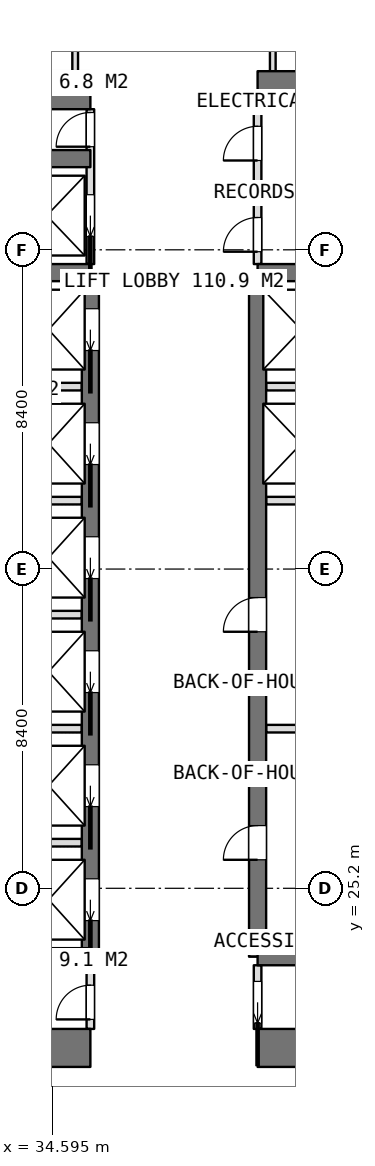
"""IFC4 building model, lengths in metres.
Left out: names, types, materials, properties, quantities, classifications, styles, units other than length and angle.
Written with IfcOpenShell. Run it as: python <this file> out.ifc"""

import sys

from ifc_helpers import new_model, si_unit, direction, frame, frame_2d, origin, place, context, subcontext, project, spatial, rectangle, extrude, element, fill, save


model = new_model("IFC4")
c1 = context("Model", 3, precision=1e-05, world=origin(), true_north=direction((0.0, 1.0)))
c2 = subcontext(c1, "Body", "Model", "MODEL_VIEW")
j1 = project(units=[si_unit("LENGTHUNIT", "METRE"), si_unit("PLANEANGLEUNIT", "RADIAN")], contexts=[c1])
p1 = place(None, origin())
s1 = spatial("IfcSite", under=j1, at=p1, CompositionType="ELEMENT")
p2 = place(p1, origin())
s2 = spatial("IfcBuilding", under=s1, at=p2, CompositionType="ELEMENT")
p3 = place(p2, frame((0.0, 0.0, 225.2)))
s3 = spatial("IfcBuildingStorey", under=s2, at=p3, CompositionType="ELEMENT", Elevation=225.2)
p4 = place(p3, frame((25.2, 21.0, 0.0), z_axis=(0.0, 0.0, 1.0), x_axis=(1.0, 0.0, 0.0)))
e1 = element("IfcWall", 1, at=p4, inside=s3, PredefinedType="SHEAR", context=c2, shape_type="SweptSolid", body=[
    extrude(rectangle(XDim=10.4, YDim=1.0, at=frame_2d((5.2, 0.0))), origin(), (0.0, 0.0, 1.0), 3.75),
])
p5 = place(p3, frame((40.0, 21.0, 0.0), z_axis=(0.0, 0.0, 1.0), x_axis=(1.0, 0.0, 0.0)))
e2 = element("IfcWall", 2, at=p5, inside=s3, PredefinedType="SHEAR", context=c2, shape_type="SweptSolid", body=[
    extrude(rectangle(XDim=10.4, YDim=1.0, at=frame_2d((5.2, 0.0))), origin(), (0.0, 0.0, 1.0), 3.75),
])
p6 = place(p3, frame((25.2, 46.2, 0.0), z_axis=(0.0, 0.0, 1.0), x_axis=(1.0, 0.0, 0.0)))
e3 = element("IfcWall", 3, at=p6, inside=s3, PredefinedType="SHEAR", context=c2, shape_type="SweptSolid", body=[
    extrude(rectangle(XDim=10.4, YDim=1.0, at=frame_2d((5.2, 0.0))), origin(), (0.0, 0.0, 1.0), 3.75),
])
p7 = place(p3, frame((40.0, 46.2, 0.0), z_axis=(0.0, 0.0, 1.0), x_axis=(1.0, 0.0, 0.0)))
e4 = element("IfcWall", 4, at=p7, inside=s3, PredefinedType="SHEAR", context=c2, shape_type="SweptSolid", body=[
    extrude(rectangle(XDim=10.4, YDim=1.0, at=frame_2d((5.2, 0.0))), origin(), (0.0, 0.0, 1.0), 3.75),
])
p8 = place(p3, frame((35.6, 23.4, 0.0), z_axis=(0.0, 0.0, 1.0), x_axis=(0.0, 1.0, 0.0)))
e5 = element("IfcWall", 5, at=p8, inside=s3, PredefinedType="SHEAR", context=c2, shape_type="SweptSolid", body=[
    extrude(rectangle(XDim=18.0, YDim=0.45, at=frame_2d((9.0, 0.0))), origin(), (0.0, 0.0, 1.0), 3.75),
])
p9 = place(p8, frame((0.95, 0.0, 0.0)))
e6 = element("IfcOpeningElement", 6, at=p9, cuts=e5, PredefinedType="OPENING", context=c2, shape_type="SweptSolid", body=[
    extrude(rectangle(XDim=1.1, YDim=2.1, at=frame_2d((0.55, 1.05))), frame((0.0, 0.235, 0.0), z_axis=(0.0, -1.0, 0.0), x_axis=(1.0, 0.0, 0.0)), (0.0, 0.0, 1.0), 0.47),
])
p10 = place(p8, frame((3.95, 0.0, 0.0)))
e7 = element("IfcOpeningElement", 7, at=p10, cuts=e5, PredefinedType="OPENING", context=c2, shape_type="SweptSolid", body=[
    extrude(rectangle(XDim=1.1, YDim=2.1, at=frame_2d((0.55, 1.05))), frame((0.0, 0.235, 0.0), z_axis=(0.0, -1.0, 0.0), x_axis=(1.0, 0.0, 0.0)), (0.0, 0.0, 1.0), 0.47),
])
p11 = place(p8, frame((6.95, 0.0, 0.0)))
e8 = element("IfcOpeningElement", 8, at=p11, cuts=e5, PredefinedType="OPENING", context=c2, shape_type="SweptSolid", body=[
    extrude(rectangle(XDim=1.1, YDim=2.1, at=frame_2d((0.55, 1.05))), frame((0.0, 0.235, 0.0), z_axis=(0.0, -1.0, 0.0), x_axis=(1.0, 0.0, 0.0)), (0.0, 0.0, 1.0), 0.47),
])
p12 = place(p8, frame((9.95, 0.0, 0.0)))
e9 = element("IfcOpeningElement", 9, at=p12, cuts=e5, PredefinedType="OPENING", context=c2, shape_type="SweptSolid", body=[
    extrude(rectangle(XDim=1.1, YDim=2.1, at=frame_2d((0.55, 1.05))), frame((0.0, 0.235, 0.0), z_axis=(0.0, -1.0, 0.0), x_axis=(1.0, 0.0, 0.0)), (0.0, 0.0, 1.0), 0.47),
])
p13 = place(p8, frame((12.95, 0.0, 0.0)))
e10 = element("IfcOpeningElement", 10, at=p13, cuts=e5, PredefinedType="OPENING", context=c2, shape_type="SweptSolid", body=[
    extrude(rectangle(XDim=1.1, YDim=2.1, at=frame_2d((0.55, 1.05))), frame((0.0, 0.235, 0.0), z_axis=(0.0, -1.0, 0.0), x_axis=(1.0, 0.0, 0.0)), (0.0, 0.0, 1.0), 0.47),
])
p14 = place(p8, frame((15.95, 0.0, 0.0)))
e11 = element("IfcOpeningElement", 11, at=p14, cuts=e5, PredefinedType="OPENING", context=c2, shape_type="SweptSolid", body=[
    extrude(rectangle(XDim=1.1, YDim=2.1, at=frame_2d((0.55, 1.05))), frame((0.0, 0.235, 0.0), z_axis=(0.0, -1.0, 0.0), x_axis=(1.0, 0.0, 0.0)), (0.0, 0.0, 1.0), 0.47),
])
p15 = place(p3, frame((40.0, 23.4, 0.0), z_axis=(0.0, 0.0, 1.0), x_axis=(0.0, 1.0, 0.0)))
e12 = element("IfcWall", 12, at=p15, inside=s3, PredefinedType="SHEAR", context=c2, shape_type="SweptSolid", body=[
    extrude(rectangle(XDim=18.0, YDim=0.45, at=frame_2d((9.0, 0.0))), origin(), (0.0, 0.0, 1.0), 3.75),
])
p16 = place(p15, frame((2.55, 0.0, 0.0)))
e13 = element("IfcOpeningElement", 13, at=p16, cuts=e12, PredefinedType="OPENING", context=c2, shape_type="SweptSolid", body=[
    extrude(rectangle(XDim=0.9, YDim=2.1, at=frame_2d((0.45, 1.05))), frame((0.0, 0.235, 0.0), z_axis=(0.0, -1.0, 0.0), x_axis=(1.0, 0.0, 0.0)), (0.0, 0.0, 1.0), 0.47),
])
p17 = place(p15, frame((8.55, 0.0, 0.0)))
e14 = element("IfcOpeningElement", 14, at=p17, cuts=e12, PredefinedType="OPENING", context=c2, shape_type="SweptSolid", body=[
    extrude(rectangle(XDim=0.9, YDim=2.1, at=frame_2d((0.45, 1.05))), frame((0.0, 0.235, 0.0), z_axis=(0.0, -1.0, 0.0), x_axis=(1.0, 0.0, 0.0)), (0.0, 0.0, 1.0), 0.47),
])
for number, where, z_axis, x_axis in (
    (15, (31.8, 23.4, 0.0), (0.0, 0.0, 1.0), (1.0, 0.0, 0.0)),
    (16, (31.8, 41.4, 0.0), (0.0, 0.0, 1.0), (1.0, 0.0, 0.0)),
    (17, (31.8, 44.4, 0.0), (0.0, 0.0, 1.0), (1.0, 0.0, 0.0)),
    (18, (40.0, 23.4, 0.0), (0.0, 0.0, 1.0), (1.0, 0.0, 0.0)),
    (19, (40.0, 41.4, 0.0), (0.0, 0.0, 1.0), (1.0, 0.0, 0.0)),
):
    element("IfcWall", number, at=place(p3, frame(where, z_axis=z_axis, x_axis=x_axis)), inside=s3, PredefinedType="SHEAR", context=c2, shape_type="SweptSolid", body=[
        extrude(rectangle(XDim=3.8, YDim=0.45, at=frame_2d((1.9, 0.0))), origin(), (0.0, 0.0, 1.0), 3.75),
    ])
for number, where, z_axis, x_axis in (
    (20, (32.025, 26.4, 0.0), (0.0, 0.0, 1.0), (1.0, 0.0, 0.0)),
    (21, (32.025, 29.4, 0.0), (0.0, 0.0, 1.0), (1.0, 0.0, 0.0)),
    (22, (32.025, 32.4, 0.0), (0.0, 0.0, 1.0), (1.0, 0.0, 0.0)),
    (23, (32.025, 35.4, 0.0), (0.0, 0.0, 1.0), (1.0, 0.0, 0.0)),
    (24, (32.025, 38.4, 0.0), (0.0, 0.0, 1.0), (1.0, 0.0, 0.0)),
):
    element("IfcWall", number, at=place(p3, frame(where, z_axis=z_axis, x_axis=x_axis)), inside=s3, PredefinedType="PARTITIONING", context=c2, shape_type="SweptSolid", body=[
        extrude(rectangle(XDim=3.35, YDim=0.2, at=frame_2d((1.675, 0.0))), origin(), (0.0, 0.0, 1.0), 3.5),
    ])
for number, where, z_axis, x_axis in (
    (25, (40.225, 29.4, 0.0), (0.0, 0.0, 1.0), (1.0, 0.0, 0.0)),
    (26, (40.225, 35.4, 0.0), (0.0, 0.0, 1.0), (1.0, 0.0, 0.0)),
    (27, (40.225, 38.4, 0.0), (0.0, 0.0, 1.0), (1.0, 0.0, 0.0)),
):
    element("IfcWall", number, at=place(p3, frame(where, z_axis=z_axis, x_axis=x_axis)), inside=s3, PredefinedType="PARTITIONING", context=c2, shape_type="SweptSolid", body=[
        extrude(rectangle(XDim=3.35, YDim=0.2, at=frame_2d((1.675, 0.0))), origin(), (0.0, 0.0, 1.0), 3.5),
    ])
p18 = place(p3, frame((40.0, 21.5, 0.0), z_axis=(0.0, 0.0, 1.0), x_axis=(0.0, 1.0, 0.0)))
e28 = element("IfcWall", 28, at=p18, inside=s3, PredefinedType="PARTITIONING", context=c2, shape_type="SweptSolid", body=[
    extrude(rectangle(XDim=1.675, YDim=0.2, at=frame_2d((0.837, 0.0))), origin(), (0.0, 0.0, 1.0), 3.5),
])
p19 = place(p18, frame((0.15, 0.0, 0.0)))
e29 = element("IfcOpeningElement", 29, at=p19, cuts=e28, PredefinedType="OPENING", context=c2, shape_type="SweptSolid", body=[
    extrude(rectangle(XDim=1.1, YDim=2.1, at=frame_2d((0.55, 1.05))), frame((0.0, 0.11, 0.0), z_axis=(0.0, -1.0, 0.0), x_axis=(1.0, 0.0, 0.0)), (0.0, 0.0, 1.0), 0.22),
])
p20 = place(p3, frame((40.0, 41.625, 0.0), z_axis=(0.0, 0.0, 1.0), x_axis=(0.0, 1.0, 0.0)))
e30 = element("IfcWall", 30, at=p20, inside=s3, PredefinedType="PARTITIONING", context=c2, shape_type="SweptSolid", body=[
    extrude(rectangle(XDim=4.075, YDim=0.2, at=frame_2d((2.038, 0.0))), origin(), (0.0, 0.0, 1.0), 3.5),
])
p21 = place(p20, frame((2.725, 0.0, 0.0)))
e31 = element("IfcOpeningElement", 31, at=p21, cuts=e30, PredefinedType="OPENING", context=c2, shape_type="SweptSolid", body=[
    extrude(rectangle(XDim=0.9, YDim=2.1, at=frame_2d((0.45, 1.05))), frame((0.0, 0.11, 0.0), z_axis=(0.0, -1.0, 0.0), x_axis=(1.0, 0.0, 0.0)), (0.0, 0.0, 1.0), 0.22),
])
p22 = place(p20, frame((0.325, 0.0, 0.0)))
e32 = element("IfcOpeningElement", 32, at=p22, cuts=e30, PredefinedType="OPENING", context=c2, shape_type="SweptSolid", body=[
    extrude(rectangle(XDim=0.9, YDim=2.1, at=frame_2d((0.45, 1.05))), frame((0.0, 0.11, 0.0), z_axis=(0.0, -1.0, 0.0), x_axis=(1.0, 0.0, 0.0)), (0.0, 0.0, 1.0), 0.22),
])
p23 = place(p3, frame((35.6, 41.625, 0.0), z_axis=(0.0, 0.0, 1.0), x_axis=(0.0, 1.0, 0.0)))
e33 = element("IfcWall", 33, at=p23, inside=s3, PredefinedType="PARTITIONING", context=c2, shape_type="SweptSolid", body=[
    extrude(rectangle(XDim=4.075, YDim=0.2, at=frame_2d((2.038, 0.0))), origin(), (0.0, 0.0, 1.0), 3.5),
])
p24 = place(p23, frame((3.088, 0.0, 0.0)))
e34 = element("IfcOpeningElement", 34, at=p24, cuts=e33, PredefinedType="OPENING", context=c2, shape_type="SweptSolid", body=[
    extrude(rectangle(XDim=0.9, YDim=2.1, at=frame_2d((0.45, 1.05))), frame((0.0, 0.11, 0.0), z_axis=(0.0, -1.0, 0.0), x_axis=(1.0, 0.0, 0.0)), (0.0, 0.0, 1.0), 0.22),
])
p25 = place(p23, frame((0.725, 0.0, 0.0)))
e35 = element("IfcOpeningElement", 35, at=p25, cuts=e33, PredefinedType="OPENING", context=c2, shape_type="SweptSolid", body=[
    extrude(rectangle(XDim=1.1, YDim=2.1, at=frame_2d((0.55, 1.05))), frame((0.0, 0.11, 0.0), z_axis=(0.0, -1.0, 0.0), x_axis=(1.0, 0.0, 0.0)), (0.0, 0.0, 1.0), 0.22),
])
p26 = place(p3, frame((35.6, 21.5, 0.0), z_axis=(0.0, 0.0, 1.0), x_axis=(0.0, 1.0, 0.0)))
e36 = element("IfcWall", 36, at=p26, inside=s3, PredefinedType="PARTITIONING", context=c2, shape_type="SweptSolid", body=[
    extrude(rectangle(XDim=1.675, YDim=0.2, at=frame_2d((0.837, 0.0))), origin(), (0.0, 0.0, 1.0), 3.5),
])
p27 = place(p26, frame((0.25, 0.0, 0.0)))
e37 = element("IfcOpeningElement", 37, at=p27, cuts=e36, PredefinedType="OPENING", context=c2, shape_type="SweptSolid", body=[
    extrude(rectangle(XDim=0.9, YDim=2.1, at=frame_2d((0.45, 1.05))), frame((0.0, 0.11, 0.0), z_axis=(0.0, -1.0, 0.0), x_axis=(1.0, 0.0, 0.0)), (0.0, 0.0, 1.0), 0.22),
])
p28 = place(p3, frame((40.0, 43.4, 0.0), z_axis=(0.0, 0.0, 1.0), x_axis=(1.0, 0.0, 0.0)))
e38 = element("IfcWall", 38, at=p28, inside=s3, PredefinedType="PARTITIONING", context=c2, shape_type="SweptSolid", body=[
    extrude(rectangle(XDim=3.575, YDim=0.2, at=frame_2d((1.788, 0.0))), origin(), (0.0, 0.0, 1.0), 3.5),
])
for number, where, z_axis, x_axis in (
    (39, (40.4, 46.7, 0.0), (0.0, 0.0, 1.0), (0.0, 1.0, 0.0)),
    (40, (35.2, 46.7, 0.0), (0.0, 0.0, 1.0), (0.0, 1.0, 0.0)),
):
    element("IfcWall", number, at=place(p3, frame(where, z_axis=z_axis, x_axis=x_axis)), inside=s3, PredefinedType="PARTITIONING", context=c2, shape_type="SweptSolid", body=[
        extrude(rectangle(XDim=2.625, YDim=0.15, at=frame_2d((1.312, 0.0))), origin(), (0.0, 0.0, 1.0), 3.5),
    ])
p29 = place(p19, origin())
e41 = element("IfcDoor", 41, at=p29, inside=s3, OperationType="SLIDING_TO_LEFT", PredefinedType="DOOR", context=c2, shape_type="SweptSolid", body=[
    extrude(rectangle(XDim=1.1, YDim=2.1, at=frame_2d((0.55, 1.05))), frame((0.0, 0.025, 0.0), z_axis=(0.0, -1.0, 0.0), x_axis=(1.0, 0.0, 0.0)), (0.0, 0.0, 1.0), 0.05),
])
fill(e29, e41)
p30 = place(p27, origin())
e42 = element("IfcDoor", 42, at=p30, inside=s3, OperationType="SINGLE_SWING_LEFT", PredefinedType="DOOR", context=c2, shape_type="SweptSolid", body=[
    extrude(rectangle(XDim=0.9, YDim=2.1, at=frame_2d((0.45, 1.05))), frame((0.0, 0.025, 0.0), z_axis=(0.0, -1.0, 0.0), x_axis=(1.0, 0.0, 0.0)), (0.0, 0.0, 1.0), 0.05),
])
fill(e37, e42)
p31 = place(p21, origin())
e43 = element("IfcDoor", 43, at=p31, inside=s3, OperationType="SINGLE_SWING_LEFT", PredefinedType="DOOR", context=c2, shape_type="SweptSolid", body=[
    extrude(rectangle(XDim=0.9, YDim=2.1, at=frame_2d((0.45, 1.05))), frame((0.0, 0.025, 0.0), z_axis=(0.0, -1.0, 0.0), x_axis=(1.0, 0.0, 0.0)), (0.0, 0.0, 1.0), 0.05),
])
fill(e31, e43)
p32 = place(p22, origin())
e44 = element("IfcDoor", 44, at=p32, inside=s3, OperationType="SINGLE_SWING_LEFT", PredefinedType="DOOR", context=c2, shape_type="SweptSolid", body=[
    extrude(rectangle(XDim=0.9, YDim=2.1, at=frame_2d((0.45, 1.05))), frame((0.0, 0.025, 0.0), z_axis=(0.0, -1.0, 0.0), x_axis=(1.0, 0.0, 0.0)), (0.0, 0.0, 1.0), 0.05),
])
fill(e32, e44)
p33 = place(p16, origin())
e45 = element("IfcDoor", 45, at=p33, inside=s3, OperationType="SINGLE_SWING_LEFT", PredefinedType="DOOR", context=c2, shape_type="SweptSolid", body=[
    extrude(rectangle(XDim=0.9, YDim=2.1, at=frame_2d((0.45, 1.05))), frame((0.0, 0.025, 0.0), z_axis=(0.0, -1.0, 0.0), x_axis=(1.0, 0.0, 0.0)), (0.0, 0.0, 1.0), 0.05),
])
fill(e13, e45)
p34 = place(p17, origin())
e46 = element("IfcDoor", 46, at=p34, inside=s3, OperationType="SINGLE_SWING_LEFT", PredefinedType="DOOR", context=c2, shape_type="SweptSolid", body=[
    extrude(rectangle(XDim=0.9, YDim=2.1, at=frame_2d((0.45, 1.05))), frame((0.0, 0.025, 0.0), z_axis=(0.0, -1.0, 0.0), x_axis=(1.0, 0.0, 0.0)), (0.0, 0.0, 1.0), 0.05),
])
fill(e14, e46)
p35 = place(p24, origin())
e47 = element("IfcDoor", 47, at=p35, inside=s3, OperationType="SINGLE_SWING_LEFT", PredefinedType="DOOR", context=c2, shape_type="SweptSolid", body=[
    extrude(rectangle(XDim=0.9, YDim=2.1, at=frame_2d((0.45, 1.05))), frame((0.0, 0.025, 0.0), z_axis=(0.0, -1.0, 0.0), x_axis=(1.0, 0.0, 0.0)), (0.0, 0.0, 1.0), 0.05),
])
fill(e34, e47)
p36 = place(p9, origin())
e48 = element("IfcDoor", 48, at=p36, inside=s3, OperationType="SLIDING_TO_LEFT", PredefinedType="USERDEFINED", context=c2, shape_type="SweptSolid", body=[
    extrude(rectangle(XDim=1.1, YDim=2.1, at=frame_2d((0.55, 1.05))), frame((0.0, 0.025, 0.0), z_axis=(0.0, -1.0, 0.0), x_axis=(1.0, 0.0, 0.0)), (0.0, 0.0, 1.0), 0.05),
])
fill(e6, e48)
p37 = place(p10, origin())
e49 = element("IfcDoor", 49, at=p37, inside=s3, OperationType="SLIDING_TO_LEFT", PredefinedType="USERDEFINED", context=c2, shape_type="SweptSolid", body=[
    extrude(rectangle(XDim=1.1, YDim=2.1, at=frame_2d((0.55, 1.05))), frame((0.0, 0.025, 0.0), z_axis=(0.0, -1.0, 0.0), x_axis=(1.0, 0.0, 0.0)), (0.0, 0.0, 1.0), 0.05),
])
fill(e7, e49)
p38 = place(p11, origin())
e50 = element("IfcDoor", 50, at=p38, inside=s3, OperationType="SLIDING_TO_LEFT", PredefinedType="USERDEFINED", context=c2, shape_type="SweptSolid", body=[
    extrude(rectangle(XDim=1.1, YDim=2.1, at=frame_2d((0.55, 1.05))), frame((0.0, 0.025, 0.0), z_axis=(0.0, -1.0, 0.0), x_axis=(1.0, 0.0, 0.0)), (0.0, 0.0, 1.0), 0.05),
])
fill(e8, e50)
p39 = place(p12, origin())
e51 = element("IfcDoor", 51, at=p39, inside=s3, OperationType="SLIDING_TO_LEFT", PredefinedType="USERDEFINED", context=c2, shape_type="SweptSolid", body=[
    extrude(rectangle(XDim=1.1, YDim=2.1, at=frame_2d((0.55, 1.05))), frame((0.0, 0.025, 0.0), z_axis=(0.0, -1.0, 0.0), x_axis=(1.0, 0.0, 0.0)), (0.0, 0.0, 1.0), 0.05),
])
fill(e9, e51)
p40 = place(p13, origin())
e52 = element("IfcDoor", 52, at=p40, inside=s3, OperationType="SLIDING_TO_LEFT", PredefinedType="USERDEFINED", context=c2, shape_type="SweptSolid", body=[
    extrude(rectangle(XDim=1.1, YDim=2.1, at=frame_2d((0.55, 1.05))), frame((0.0, 0.025, 0.0), z_axis=(0.0, -1.0, 0.0), x_axis=(1.0, 0.0, 0.0)), (0.0, 0.0, 1.0), 0.05),
])
fill(e10, e52)
p41 = place(p14, origin())
e53 = element("IfcDoor", 53, at=p41, inside=s3, OperationType="SLIDING_TO_LEFT", PredefinedType="USERDEFINED", context=c2, shape_type="SweptSolid", body=[
    extrude(rectangle(XDim=1.1, YDim=2.1, at=frame_2d((0.55, 1.05))), frame((0.0, 0.025, 0.0), z_axis=(0.0, -1.0, 0.0), x_axis=(1.0, 0.0, 0.0)), (0.0, 0.0, 1.0), 0.05),
])
fill(e11, e53)
p42 = place(p25, origin())
e54 = element("IfcDoor", 54, at=p42, inside=s3, OperationType="SLIDING_TO_LEFT", PredefinedType="USERDEFINED", context=c2, shape_type="SweptSolid", body=[
    extrude(rectangle(XDim=1.1, YDim=2.1, at=frame_2d((0.55, 1.05))), frame((0.0, 0.025, 0.0), z_axis=(0.0, -1.0, 0.0), x_axis=(1.0, 0.0, 0.0)), (0.0, 0.0, 1.0), 0.05),
])
fill(e35, e54)
save(model, sys.argv[1])
